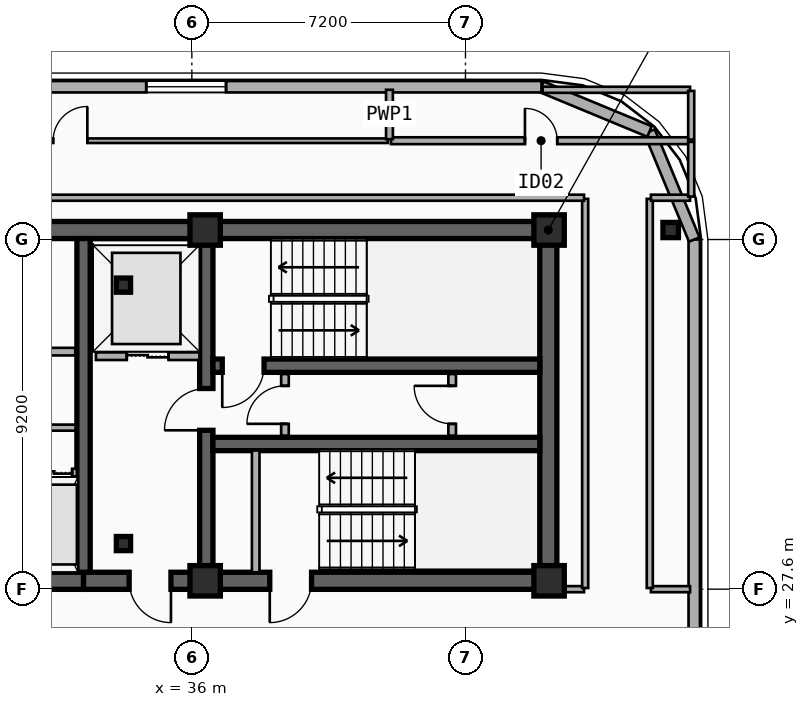
"""IFC4 building model, lengths in metres.
Left out: names, types, materials, properties, quantities, classifications, styles, units other than length and angle.
Written with IfcOpenShell. Run it as: python <this file> out.ifc"""

import sys

from ifc_helpers import new_model, si_unit, direction, frame, frame_2d, origin, origin_2d, place, context, subcontext, project, spatial, rectangle, i_section, extrude, element, fill, save


model = new_model("IFC4")
c1 = context("Model", 3, precision=1e-05, world=origin(), true_north=direction((0.0, 1.0)))
c2 = subcontext(c1, "Body", "Model", "MODEL_VIEW")
j1 = project(units=[si_unit("LENGTHUNIT", "METRE"), si_unit("PLANEANGLEUNIT", "RADIAN")], contexts=[c1])
p1 = place(None, origin())
s1 = spatial("IfcSite", under=j1, at=p1, CompositionType="ELEMENT")
p2 = place(p1, origin())
s2 = spatial("IfcBuilding", under=s1, at=p2, CompositionType="ELEMENT")
p3 = place(p2, frame((0.0, 0.0, 265.8)))
s3 = spatial("IfcBuildingStorey", under=s2, at=p3, CompositionType="ELEMENT", Elevation=265.8)
p4 = place(p3, frame((12.15, 37.05, 0.0), z_axis=(0.0, 0.0, 1.0), x_axis=(1.0, 0.0, 0.0)))
e1 = element("IfcWall", 1, at=p4, inside=s3, PredefinedType="SHEAR", context=c2, shape_type="SweptSolid", body=[
    extrude(rectangle(XDim=33.23, YDim=0.45, at=frame_2d((16.615, 0.0))), origin(), (0.0, 0.0, 1.0), 3.7),
])
p5 = place(p3, frame((33.15, 27.82, 0.0), z_axis=(0.0, 0.0, 1.0), x_axis=(-1.0, 0.0, 0.0)))
e2 = element("IfcWall", 2, at=p5, inside=s3, PredefinedType="SHEAR", context=c2, shape_type="SweptSolid", body=[
    extrude(rectangle(XDim=11.97, YDim=0.45, at=frame_2d((5.985, 0.0))), origin(), (0.0, 0.0, 1.0), 3.7),
])
p6 = place(p5, frame((6.1, 0.0, 0.0)))
e3 = element("IfcOpeningElement", 3, at=p6, cuts=e2, PredefinedType="OPENING", context=c2, shape_type="SweptSolid", body=[
    extrude(rectangle(XDim=1.6, YDim=2.2, at=frame_2d((0.8, 1.1))), frame((0.0, 0.235, 0.0), z_axis=(0.0, -1.0, 0.0), x_axis=(1.0, 0.0, 0.0)), (0.0, 0.0, 1.0), 0.47),
])
p7 = place(p3, frame((45.38, 27.82, 0.0), z_axis=(0.0, 0.0, 1.0), x_axis=(-1.0, 0.0, 0.0)))
e4 = element("IfcWall", 4, at=p7, inside=s3, PredefinedType="SHEAR", context=c2, shape_type="SweptSolid", body=[
    extrude(rectangle(XDim=12.23, YDim=0.45, at=frame_2d((6.115, 0.0))), origin(), (0.0, 0.0, 1.0), 3.7),
])
p8 = place(p7, frame((9.93, 0.0, 0.0)))
e5 = element("IfcOpeningElement", 5, at=p8, cuts=e4, PredefinedType="OPENING", context=c2, shape_type="SweptSolid", body=[
    extrude(rectangle(XDim=1.1, YDim=2.15, at=frame_2d((0.55, 1.075))), frame((0.0, 0.235, 0.0), z_axis=(0.0, -1.0, 0.0), x_axis=(1.0, 0.0, 0.0)), (0.0, 0.0, 1.0), 0.47),
])
p9 = place(p7, frame((6.23, 0.0, 0.0)))
e6 = element("IfcOpeningElement", 6, at=p9, cuts=e4, PredefinedType="OPENING", context=c2, shape_type="SweptSolid", body=[
    extrude(rectangle(XDim=1.1, YDim=2.15, at=frame_2d((0.55, 1.075))), frame((0.0, 0.235, 0.0), z_axis=(0.0, -1.0, 0.0), x_axis=(1.0, 0.0, 0.0)), (0.0, 0.0, 1.0), 0.47),
])
p10 = place(p3, frame((45.38, 28.045, 0.0), z_axis=(0.0, 0.0, 1.0), x_axis=(0.0, 1.0, 0.0)))
e7 = element("IfcWall", 7, at=p10, inside=s3, PredefinedType="SHEAR", context=c2, shape_type="SweptSolid", body=[
    extrude(rectangle(XDim=8.78, YDim=0.45, at=frame_2d((4.39, 0.0))), origin(), (0.0, 0.0, 1.0), 3.7),
])
p11 = place(p3, frame((33.15, 28.045, 0.0), z_axis=(0.0, 0.0, 1.0), x_axis=(0.0, 1.0, 0.0)))
e8 = element("IfcWall", 8, at=p11, inside=s3, PredefinedType="SHEAR", context=c2, shape_type="SweptSolid", body=[
    extrude(rectangle(XDim=8.78, YDim=0.35, at=frame_2d((4.39, 0.0))), origin(), (0.0, 0.0, 1.0), 3.7),
])
p12 = place(p3, frame((36.38, 28.045, 0.0), z_axis=(0.0, 0.0, 1.0), x_axis=(0.0, 1.0, 0.0)))
e9 = element("IfcWall", 9, at=p12, inside=s3, PredefinedType="SHEAR", context=c2, shape_type="SweptSolid", body=[
    extrude(rectangle(XDim=8.78, YDim=0.35, at=frame_2d((4.39, 0.0))), origin(), (0.0, 0.0, 1.0), 3.7),
])
p13 = place(p12, frame((3.735, 0.0, 0.0)))
e10 = element("IfcOpeningElement", 10, at=p13, cuts=e9, PredefinedType="OPENING", context=c2, shape_type="SweptSolid", body=[
    extrude(rectangle(XDim=1.1, YDim=2.15, at=frame_2d((0.55, 1.075))), frame((0.0, 0.185, 0.0), z_axis=(0.0, -1.0, 0.0), x_axis=(1.0, 0.0, 0.0)), (0.0, 0.0, 1.0), 0.37),
])
p14 = place(p3, frame((45.155, 33.48, 0.0), z_axis=(0.0, 0.0, 1.0), x_axis=(-1.0, 0.0, 0.0)))
e11 = element("IfcWall", 11, at=p14, inside=s3, PredefinedType="SHEAR", context=c2, shape_type="SweptSolid", body=[
    extrude(rectangle(XDim=8.6, YDim=0.35, at=frame_2d((4.3, 0.0))), origin(), (0.0, 0.0, 1.0), 3.7),
])
p15 = place(p14, frame((7.255, 0.0, 0.0)))
e12 = element("IfcOpeningElement", 12, at=p15, cuts=e11, PredefinedType="OPENING", context=c2, shape_type="SweptSolid", body=[
    extrude(rectangle(XDim=1.1, YDim=2.15, at=frame_2d((0.55, 1.075))), frame((0.0, 0.185, 0.0), z_axis=(0.0, -1.0, 0.0), x_axis=(1.0, 0.0, 0.0)), (0.0, 0.0, 1.0), 0.37),
])
p16 = place(p3, frame((36.555, 31.42, 0.0), z_axis=(0.0, 0.0, 1.0), x_axis=(1.0, 0.0, 0.0)))
e13 = element("IfcWall", 13, at=p16, inside=s3, PredefinedType="SHEAR", context=c2, shape_type="SweptSolid", body=[
    extrude(rectangle(XDim=8.6, YDim=0.35, at=frame_2d((4.3, 0.0))), origin(), (0.0, 0.0, 1.0), 3.7),
])
for number, where, z_axis, x_axis in (
    (14, (34.2, 28.8, 0.0), (0.0, 0.0, 1.0), (1.0, 0.0, 0.0)),
    (15, (34.2, 35.6, 0.0), (0.0, 0.0, 1.0), (1.0, 0.0, 0.0)),
):
    element("IfcColumn", number, at=place(p3, frame(where, z_axis=z_axis, x_axis=x_axis)), inside=s3, PredefinedType="COLUMN", context=c2, shape_type="SweptSolid", body=[
        extrude(i_section(OverallWidth=0.374, OverallDepth=0.372, WebThickness=0.017, FlangeThickness=0.027, FilletRadius=0.015, at=origin_2d()), origin(), (0.0, 0.0, 1.0), 3.7),
    ])
for number, where, z_axis, x_axis in (
    (16, (36.35, 27.82, 0.0), (0.0, 0.0, 1.0), (1.0, 0.0, 0.0)),
    (17, (36.35, 37.05, 0.0), (0.0, 0.0, 1.0), (1.0, 0.0, 0.0)),
    (18, (45.4, 27.82, 0.0), (0.0, 0.0, 1.0), (1.0, 0.0, 0.0)),
    (19, (45.4, 37.05, 0.0), (0.0, 0.0, 1.0), (1.0, 0.0, 0.0)),
):
    element("IfcColumn", number, at=place(p3, frame(where, z_axis=z_axis, x_axis=x_axis)), inside=s3, PredefinedType="COLUMN", context=c2, shape_type="SweptSolid", body=[
        extrude(rectangle(XDim=0.8, YDim=0.8, at=origin_2d()), origin(), (0.0, 0.0, 1.0), 3.7),
    ])
p17 = place(p3, frame((48.6, 37.05, 0.0), z_axis=(0.0, 0.0, 1.0), x_axis=(1.0, 0.0, 0.0)))
e20 = element("IfcColumn", 20, at=p17, inside=s3, PredefinedType="COLUMN", context=c2, shape_type="SweptSolid", body=[
    extrude(i_section(OverallWidth=0.408, OverallDepth=0.4, WebThickness=0.025, FlangeThickness=0.039, FilletRadius=0.015, at=origin_2d()), origin(), (0.0, 0.0, 1.0), 3.7),
])
p18 = place(p3, frame((49.22, 36.8, 0.0), z_axis=(0.0, 0.0, 1.0), x_axis=(0.0, -1.0, 0.0)))
e21 = element("IfcWall", 21, at=p18, inside=s3, PredefinedType="SOLIDWALL", context=c2, shape_type="SweptSolid", body=[
    extrude(rectangle(XDim=34.2, YDim=0.3, at=frame_2d((17.1, 0.0))), origin(), (0.0, 0.0, 1.0), 3.42),
])
p19 = place(p18, frame((17.66, 0.0, 0.75)))
e22 = element("IfcOpeningElement", 22, at=p19, cuts=e21, PredefinedType="OPENING", context=c2, shape_type="SweptSolid", body=[
    extrude(rectangle(XDim=2.1, YDim=2.1, at=frame_2d((1.05, 1.05))), frame((0.0, 0.16, 0.0), z_axis=(0.0, -1.0, 0.0), x_axis=(1.0, 0.0, 0.0)), (0.0, 0.0, 1.0), 0.32),
])
p20 = place(p18, frame((25.77, 0.0, 0.75)))
e23 = element("IfcOpeningElement", 23, at=p20, cuts=e21, PredefinedType="OPENING", context=c2, shape_type="SweptSolid", body=[
    extrude(rectangle(XDim=2.1, YDim=2.1, at=frame_2d((1.05, 1.05))), frame((0.0, 0.16, 0.0), z_axis=(0.0, -1.0, 0.0), x_axis=(1.0, 0.0, 0.0)), (0.0, 0.0, 1.0), 0.32),
])
for number, where, z_axis, x_axis in (
    (24, (48.042, 39.643, 0.0), (0.0, 0.0, 1.0), (0.383, -0.924, 0.0)),
    (25, (45.2, 40.82, 0.0), (0.0, 0.0, 1.0), (0.924, -0.383, 0.0)),
):
    element("IfcWall", number, at=place(p3, frame(where, z_axis=z_axis, x_axis=x_axis)), inside=s3, PredefinedType="SOLIDWALL", context=c2, shape_type="SweptSolid", body=[
        extrude(rectangle(XDim=3.077, YDim=0.3, at=frame_2d((1.538, 0.0))), origin(), (0.0, 0.0, 1.0), 3.42),
    ])
p21 = place(p3, frame((12.4, 40.82, 0.0), z_axis=(0.0, 0.0, 1.0), x_axis=(1.0, 0.0, 0.0)))
e26 = element("IfcWall", 26, at=p21, inside=s3, PredefinedType="SOLIDWALL", context=c2, shape_type="SweptSolid", body=[
    extrude(rectangle(XDim=32.8, YDim=0.3, at=frame_2d((16.4, 0.0))), origin(), (0.0, 0.0, 1.0), 3.42),
])
p22 = place(p21, frame((2.713, 0.0, 0.75)))
e27 = element("IfcOpeningElement", 27, at=p22, cuts=e26, PredefinedType="OPENING", context=c2, shape_type="SweptSolid", body=[
    extrude(rectangle(XDim=2.1, YDim=2.1, at=frame_2d((1.05, 1.05))), frame((0.0, 0.16, 0.0), z_axis=(0.0, -1.0, 0.0), x_axis=(1.0, 0.0, 0.0)), (0.0, 0.0, 1.0), 0.32),
])
p23 = place(p21, frame((7.207, 0.0, 0.75)))
e28 = element("IfcOpeningElement", 28, at=p23, cuts=e26, PredefinedType="OPENING", context=c2, shape_type="SweptSolid", body=[
    extrude(rectangle(XDim=2.1, YDim=2.1, at=frame_2d((1.05, 1.05))), frame((0.0, 0.16, 0.0), z_axis=(0.0, -1.0, 0.0), x_axis=(1.0, 0.0, 0.0)), (0.0, 0.0, 1.0), 0.32),
])
p24 = place(p21, frame((16.3, 0.0, 0.75)))
e29 = element("IfcOpeningElement", 29, at=p24, cuts=e26, PredefinedType="OPENING", context=c2, shape_type="SweptSolid", body=[
    extrude(rectangle(XDim=2.1, YDim=2.1, at=frame_2d((1.05, 1.05))), frame((0.0, 0.16, 0.0), z_axis=(0.0, -1.0, 0.0), x_axis=(1.0, 0.0, 0.0)), (0.0, 0.0, 1.0), 0.32),
])
p25 = place(p21, frame((22.4, 0.0, 0.75)))
e30 = element("IfcOpeningElement", 30, at=p25, cuts=e26, PredefinedType="OPENING", context=c2, shape_type="SweptSolid", body=[
    extrude(rectangle(XDim=2.1, YDim=2.1, at=frame_2d((1.05, 1.05))), frame((0.0, 0.16, 0.0), z_axis=(0.0, -1.0, 0.0), x_axis=(1.0, 0.0, 0.0)), (0.0, 0.0, 1.0), 0.32),
])
p26 = place(p3, frame((33.475, 33.73, 0.0), z_axis=(0.0, 0.0, 1.0), x_axis=(1.0, 0.0, 0.0)))
e31 = element("IfcWall", 31, at=p26, inside=s3, PredefinedType="PARTITIONING", context=c2, shape_type="SweptSolid", body=[
    extrude(rectangle(XDim=2.725, YDim=0.2, at=frame_2d((1.362, 0.0))), origin(), (0.0, 0.0, 1.0), 2.49),
])
p27 = place(p26, frame((0.812, 0.0, 0.0)))
e32 = element("IfcOpeningElement", 32, at=p27, cuts=e31, PredefinedType="OPENING", context=c2, shape_type="SweptSolid", body=[
    extrude(rectangle(XDim=1.1, YDim=2.15, at=frame_2d((0.55, 1.075))), frame((0.0, 0.11, 0.0), z_axis=(0.0, -1.0, 0.0), x_axis=(1.0, 0.0, 0.0)), (0.0, 0.0, 1.0), 0.22),
])
p28 = place(p3, frame((31.775, 30.67, 0.0), z_axis=(0.0, 0.0, 1.0), x_axis=(1.0, 0.0, 0.0)))
e33 = element("IfcWall", 33, at=p28, inside=s3, PredefinedType="PARTITIONING", context=c2, shape_type="SweptSolid", body=[
    extrude(rectangle(XDim=1.2, YDim=0.2, at=frame_2d((0.6, 0.0))), origin(), (0.0, 0.0, 1.0), 2.8),
])
p29 = place(p28, frame((0.125, 0.0, 0.0)))
e34 = element("IfcOpeningElement", 34, at=p29, cuts=e33, PredefinedType="OPENING", context=c2, shape_type="SweptSolid", body=[
    extrude(rectangle(XDim=0.95, YDim=2.15, at=frame_2d((0.475, 1.075))), frame((0.0, 0.11, 0.0), z_axis=(0.0, -1.0, 0.0), x_axis=(1.0, 0.0, 0.0)), (0.0, 0.0, 1.0), 0.22),
])
p30 = place(p3, frame((37.68, 28.045, 0.0), z_axis=(0.0, 0.0, 1.0), x_axis=(0.0, 1.0, 0.0)))
e35 = element("IfcWall", 35, at=p30, inside=s3, PredefinedType="PARTITIONING", context=c2, shape_type="SweptSolid", body=[
    extrude(rectangle(XDim=3.205, YDim=0.2, at=frame_2d((1.603, 0.0))), origin(), (0.0, 0.0, 1.0), 2.8),
])
p31 = place(p3, frame((38.45, 31.64, 0.0), z_axis=(0.0, 0.0, 1.0), x_axis=(0.0, 1.0, 0.0)))
e36 = element("IfcWall", 36, at=p31, inside=s3, PredefinedType="PARTITIONING", context=c2, shape_type="SweptSolid", body=[
    extrude(rectangle(XDim=1.62, YDim=0.2, at=frame_2d((0.81, 0.0))), origin(), (0.0, 0.0, 1.0), 3.42),
])
p32 = place(p31, frame((0.31, 0.0, 0.0)))
e37 = element("IfcOpeningElement", 37, at=p32, cuts=e36, PredefinedType="OPENING", context=c2, shape_type="SweptSolid", body=[
    extrude(rectangle(XDim=1.0, YDim=2.15, at=frame_2d((0.5, 1.075))), frame((0.0, 0.11, 0.0), z_axis=(0.0, -1.0, 0.0), x_axis=(1.0, 0.0, 0.0)), (0.0, 0.0, 1.0), 0.22),
])
p33 = place(p3, frame((42.85, 31.64, 0.0), z_axis=(0.0, 0.0, 1.0), x_axis=(0.0, 1.0, 0.0)))
e38 = element("IfcWall", 38, at=p33, inside=s3, PredefinedType="PARTITIONING", context=c2, shape_type="SweptSolid", body=[
    extrude(rectangle(XDim=1.62, YDim=0.2, at=frame_2d((0.81, 0.0))), origin(), (0.0, 0.0, 1.0), 3.42),
])
p34 = place(p33, frame((0.31, 0.0, 0.0)))
e39 = element("IfcOpeningElement", 39, at=p34, cuts=e38, PredefinedType="OPENING", context=c2, shape_type="SweptSolid", body=[
    extrude(rectangle(XDim=1.0, YDim=2.15, at=frame_2d((0.5, 1.075))), frame((0.0, 0.11, 0.0), z_axis=(0.0, -1.0, 0.0), x_axis=(1.0, 0.0, 0.0)), (0.0, 0.0, 1.0), 0.22),
])
p35 = place(p3, frame((29.09, 33.85, 0.0), z_axis=(0.0, 0.0, 1.0), x_axis=(1.0, 0.0, 0.0)))
e40 = element("IfcWall", 40, at=p35, inside=s3, PredefinedType="PARTITIONING", context=c2, shape_type="SweptSolid", body=[
    extrude(rectangle(XDim=3.84, YDim=0.2, at=frame_2d((1.92, 0.0))), origin(), (0.0, 0.0, 1.0), 2.49),
])
p36 = place(p35, frame((1.32, 0.0, 0.0)))
e41 = element("IfcOpeningElement", 41, at=p36, cuts=e40, PredefinedType="OPENING", context=c2, shape_type="SweptSolid", body=[
    extrude(rectangle(XDim=1.2, YDim=2.15, at=frame_2d((0.6, 1.075))), frame((0.0, 0.11, 0.0), z_axis=(0.0, -1.0, 0.0), x_axis=(1.0, 0.0, 0.0)), (0.0, 0.0, 1.0), 0.22),
])
p37 = place(p3, frame((24.44, 39.4, 0.0), z_axis=(0.0, 0.0, 1.0), x_axis=(1.0, 0.0, 0.0)))
e42 = element("IfcWall", 42, at=p37, inside=s3, PredefinedType="PARTITIONING", context=c2, shape_type="SweptSolid", body=[
    extrude(rectangle(XDim=16.72, YDim=0.12, at=frame_2d((8.36, 0.0))), origin(), (0.0, 0.0, 1.0), 3.42),
])
p38 = place(p37, frame((7.91, 0.0, 0.0)))
e43 = element("IfcOpeningElement", 43, at=p38, cuts=e42, PredefinedType="OPENING", context=c2, shape_type="SweptSolid", body=[
    extrude(rectangle(XDim=0.9, YDim=2.1, at=frame_2d((0.45, 1.05))), frame((0.0, 0.07, 0.0), z_axis=(0.0, -1.0, 0.0), x_axis=(1.0, 0.0, 0.0)), (0.0, 0.0, 1.0), 0.14),
])
p39 = place(p3, frame((41.24, 39.4, 0.0), z_axis=(0.0, 0.0, 1.0), x_axis=(1.0, 0.0, 0.0)))
e44 = element("IfcWall", 44, at=p39, inside=s3, PredefinedType="PLUMBINGWALL", context=c2, shape_type="SweptSolid", body=[
    extrude(rectangle(XDim=7.9, YDim=0.18, at=frame_2d((3.95, 0.0))), origin(), (0.0, 0.0, 1.0), 3.42),
])
p40 = place(p39, frame((3.525, 0.0, 0.0)))
e45 = element("IfcOpeningElement", 45, at=p40, cuts=e44, PredefinedType="OPENING", context=c2, shape_type="SweptSolid", body=[
    extrude(rectangle(XDim=0.85, YDim=2.1, at=frame_2d((0.425, 1.05))), frame((0.0, 0.1, 0.0), z_axis=(0.0, -1.0, 0.0), x_axis=(1.0, 0.0, 0.0)), (0.0, 0.0, 1.0), 0.2),
])
p41 = place(p3, frame((41.2, 39.44, 0.0), z_axis=(0.0, 0.0, 1.0), x_axis=(0.0, 1.0, 0.0)))
e46 = element("IfcWall", 46, at=p41, inside=s3, PredefinedType="PLUMBINGWALL", context=c2, shape_type="SweptSolid", body=[
    extrude(rectangle(XDim=1.3, YDim=0.18, at=frame_2d((0.65, 0.0))), origin(), (0.0, 0.0, 1.0), 3.42),
])
p42 = place(p3, frame((27.63, 31.85, 0.0), z_axis=(0.0, 0.0, 1.0), x_axis=(1.0, 0.0, 0.0)))
e47 = element("IfcWall", 47, at=p42, inside=s3, PredefinedType="PARTITIONING", context=c2, shape_type="SweptSolid", body=[
    extrude(rectangle(XDim=5.31, YDim=0.16, at=frame_2d((2.655, 0.0))), origin(), (0.0, 0.0, 1.0), 2.49),
])
p43 = place(p3, frame((45.41, 27.6, 0.0), z_axis=(0.0, 0.0, 1.0), x_axis=(1.0, 0.0, 0.0)))
e48 = element("IfcWall", 48, at=p43, inside=s3, PredefinedType="PARTITIONING", context=c2, shape_type="SweptSolid", body=[
    extrude(rectangle(XDim=0.91, YDim=0.16, at=frame_2d((0.455, 0.0))), origin(), (0.0, 0.0, 1.0), 2.49),
])
p44 = place(p3, frame((48.08, 27.6, 0.0), z_axis=(0.0, 0.0, 1.0), x_axis=(1.0, 0.0, 0.0)))
e49 = element("IfcWall", 49, at=p44, inside=s3, PredefinedType="PARTITIONING", context=c2, shape_type="SweptSolid", body=[
    extrude(rectangle(XDim=1.03, YDim=0.16, at=frame_2d((0.515, 0.0))), origin(), (0.0, 0.0, 1.0), 3.42),
])
for number, where, z_axis, x_axis in (
    (50, (46.35, 27.63, 0.0), (0.0, 0.0, 1.0), (0.0, 1.0, 0.0)),
    (51, (48.05, 27.63, 0.0), (0.0, 0.0, 1.0), (0.0, 1.0, 0.0)),
):
    element("IfcWall", number, at=place(p3, frame(where, z_axis=z_axis, x_axis=x_axis)), inside=s3, PredefinedType="PARTITIONING", context=c2, shape_type="SweptSolid", body=[
        extrude(rectangle(XDim=10.24, YDim=0.16, at=frame_2d((5.12, 0.0))), origin(), (0.0, 0.0, 1.0), 2.9),
    ])
p45 = place(p3, frame((11.28, 37.9, 0.0), z_axis=(0.0, 0.0, 1.0), x_axis=(1.0, 0.0, 0.0)))
e52 = element("IfcWall", 52, at=p45, inside=s3, PredefinedType="PARTITIONING", context=c2, shape_type="SweptSolid", body=[
    extrude(rectangle(XDim=35.04, YDim=0.16, at=frame_2d((17.52, 0.0))), origin(), (0.0, 0.0, 1.0), 3.42),
])
p46 = place(p3, frame((48.08, 37.9, 0.0), z_axis=(0.0, 0.0, 1.0), x_axis=(1.0, 0.0, 0.0)))
e53 = element("IfcWall", 53, at=p46, inside=s3, PredefinedType="PARTITIONING", context=c2, shape_type="SweptSolid", body=[
    extrude(rectangle(XDim=1.03, YDim=0.16, at=frame_2d((0.515, 0.0))), origin(), (0.0, 0.0, 1.0), 3.42),
])
p47 = place(p3, frame((49.14, 37.93, 0.0), z_axis=(0.0, 0.0, 1.0), x_axis=(0.0, 1.0, 0.0)))
e54 = element("IfcWall", 54, at=p47, inside=s3, PredefinedType="PARTITIONING", context=c2, shape_type="SweptSolid", body=[
    extrude(rectangle(XDim=1.44, YDim=0.16, at=frame_2d((0.72, 0.0))), origin(), (0.0, 0.0, 1.0), 3.42),
])
p48 = place(p3, frame((45.23, 40.74, 0.0), z_axis=(0.0, 0.0, 1.0), x_axis=(1.0, 0.0, 0.0)))
e55 = element("IfcWall", 55, at=p48, inside=s3, PredefinedType="PARTITIONING", context=c2, shape_type="SweptSolid", body=[
    extrude(rectangle(XDim=3.88, YDim=0.16, at=frame_2d((1.94, 0.0))), origin(), (0.0, 0.0, 1.0), 3.42),
])
p49 = place(p3, frame((49.14, 39.43, 0.0), z_axis=(0.0, 0.0, 1.0), x_axis=(0.0, 1.0, 0.0)))
e56 = element("IfcWall", 56, at=p49, inside=s3, PredefinedType="PARTITIONING", context=c2, shape_type="SweptSolid", body=[
    extrude(rectangle(XDim=1.28, YDim=0.16, at=frame_2d((0.64, 0.0))), origin(), (0.0, 0.0, 1.0), 3.42),
])
p50 = place(p25, origin())
e57 = element("IfcWindow", 57, at=p50, inside=s3, PartitioningType="SINGLE_PANEL", PredefinedType="WINDOW", context=c2, shape_type="SweptSolid", body=[
    extrude(rectangle(XDim=2.1, YDim=2.1, at=frame_2d((1.05, 1.05))), frame((0.0, 0.03, 0.0), z_axis=(0.0, -1.0, 0.0), x_axis=(1.0, 0.0, 0.0)), (0.0, 0.0, 1.0), 0.06),
])
fill(e30, e57)
p51 = place(p27, origin())
e58 = element("IfcDoor", 58, at=p51, inside=s3, OperationType="DOUBLE_DOOR_SLIDING", PredefinedType="DOOR", context=c2, shape_type="SweptSolid", body=[
    extrude(rectangle(XDim=1.1, YDim=2.15, at=frame_2d((0.55, 1.075))), frame((0.0, 0.025, 0.0), z_axis=(0.0, -1.0, 0.0), x_axis=(1.0, 0.0, 0.0)), (0.0, 0.0, 1.0), 0.05),
])
fill(e32, e58)
p52 = place(p29, origin())
e59 = element("IfcDoor", 59, at=p52, inside=s3, OperationType="DOUBLE_DOOR_SLIDING", PredefinedType="DOOR", context=c2, shape_type="SweptSolid", body=[
    extrude(rectangle(XDim=0.95, YDim=2.15, at=frame_2d((0.475, 1.075))), frame((0.0, 0.025, 0.0), z_axis=(0.0, -1.0, 0.0), x_axis=(1.0, 0.0, 0.0)), (0.0, 0.0, 1.0), 0.05),
])
fill(e34, e59)
p53 = place(p15, origin())
e60 = element("IfcDoor", 60, at=p53, inside=s3, OperationType="SINGLE_SWING_RIGHT", PredefinedType="DOOR", context=c2, shape_type="SweptSolid", body=[
    extrude(rectangle(XDim=1.1, YDim=2.15, at=frame_2d((0.55, 1.075))), frame((0.0, 0.025, 0.0), z_axis=(0.0, -1.0, 0.0), x_axis=(1.0, 0.0, 0.0)), (0.0, 0.0, 1.0), 0.05),
])
fill(e12, e60)
p54 = place(p13, origin())
e61 = element("IfcDoor", 61, at=p54, inside=s3, OperationType="SINGLE_SWING_LEFT", PredefinedType="DOOR", context=c2, shape_type="SweptSolid", body=[
    extrude(rectangle(XDim=1.1, YDim=2.15, at=frame_2d((0.55, 1.075))), frame((0.0, 0.025, 0.0), z_axis=(0.0, -1.0, 0.0), x_axis=(1.0, 0.0, 0.0)), (0.0, 0.0, 1.0), 0.05),
])
fill(e10, e61)
p55 = place(p8, origin())
e62 = element("IfcDoor", 62, at=p55, inside=s3, OperationType="SINGLE_SWING_LEFT", PredefinedType="DOOR", context=c2, shape_type="SweptSolid", body=[
    extrude(rectangle(XDim=1.1, YDim=2.15, at=frame_2d((0.55, 1.075))), frame((0.0, 0.025, 0.0), z_axis=(0.0, -1.0, 0.0), x_axis=(1.0, 0.0, 0.0)), (0.0, 0.0, 1.0), 0.05),
])
fill(e5, e62)
p56 = place(p9, origin())
e63 = element("IfcDoor", 63, at=p56, inside=s3, OperationType="SINGLE_SWING_RIGHT", PredefinedType="DOOR", context=c2, shape_type="SweptSolid", body=[
    extrude(rectangle(XDim=1.1, YDim=2.15, at=frame_2d((0.55, 1.075))), frame((0.0, 0.025, 0.0), z_axis=(0.0, -1.0, 0.0), x_axis=(1.0, 0.0, 0.0)), (0.0, 0.0, 1.0), 0.05),
])
fill(e6, e63)
p57 = place(p32, origin())
e64 = element("IfcDoor", 64, at=p57, inside=s3, OperationType="SINGLE_SWING_LEFT", PredefinedType="DOOR", context=c2, shape_type="SweptSolid", body=[
    extrude(rectangle(XDim=1.0, YDim=2.15, at=frame_2d((0.5, 1.075))), frame((0.0, 0.025, 0.0), z_axis=(0.0, -1.0, 0.0), x_axis=(1.0, 0.0, 0.0)), (0.0, 0.0, 1.0), 0.05),
])
fill(e37, e64)
p58 = place(p34, origin())
e65 = element("IfcDoor", 65, at=p58, inside=s3, OperationType="SINGLE_SWING_RIGHT", PredefinedType="DOOR", context=c2, shape_type="SweptSolid", body=[
    extrude(rectangle(XDim=1.0, YDim=2.15, at=frame_2d((0.5, 1.075))), frame((0.0, 0.025, 0.0), z_axis=(0.0, -1.0, 0.0), x_axis=(1.0, 0.0, 0.0)), (0.0, 0.0, 1.0), 0.05),
])
fill(e39, e65)
p59 = place(p38, origin())
e66 = element("IfcDoor", 66, at=p59, inside=s3, OperationType="SINGLE_SWING_RIGHT", PredefinedType="DOOR", context=c2, shape_type="SweptSolid", body=[
    extrude(rectangle(XDim=0.9, YDim=2.1, at=frame_2d((0.45, 1.05))), frame((0.0, 0.025, 0.0), z_axis=(0.0, -1.0, 0.0), x_axis=(1.0, 0.0, 0.0)), (0.0, 0.0, 1.0), 0.05),
])
fill(e43, e66)
p60 = place(p40, origin())
e67 = element("IfcDoor", 67, at=p60, inside=s3, OperationType="SINGLE_SWING_LEFT", PredefinedType="DOOR", context=c2, shape_type="SweptSolid", body=[
    extrude(rectangle(XDim=0.85, YDim=2.1, at=frame_2d((0.425, 1.05))), frame((0.0, 0.025, 0.0), z_axis=(0.0, -1.0, 0.0), x_axis=(1.0, 0.0, 0.0)), (0.0, 0.0, 1.0), 0.05),
])
fill(e45, e67)
save(model, sys.argv[1])
